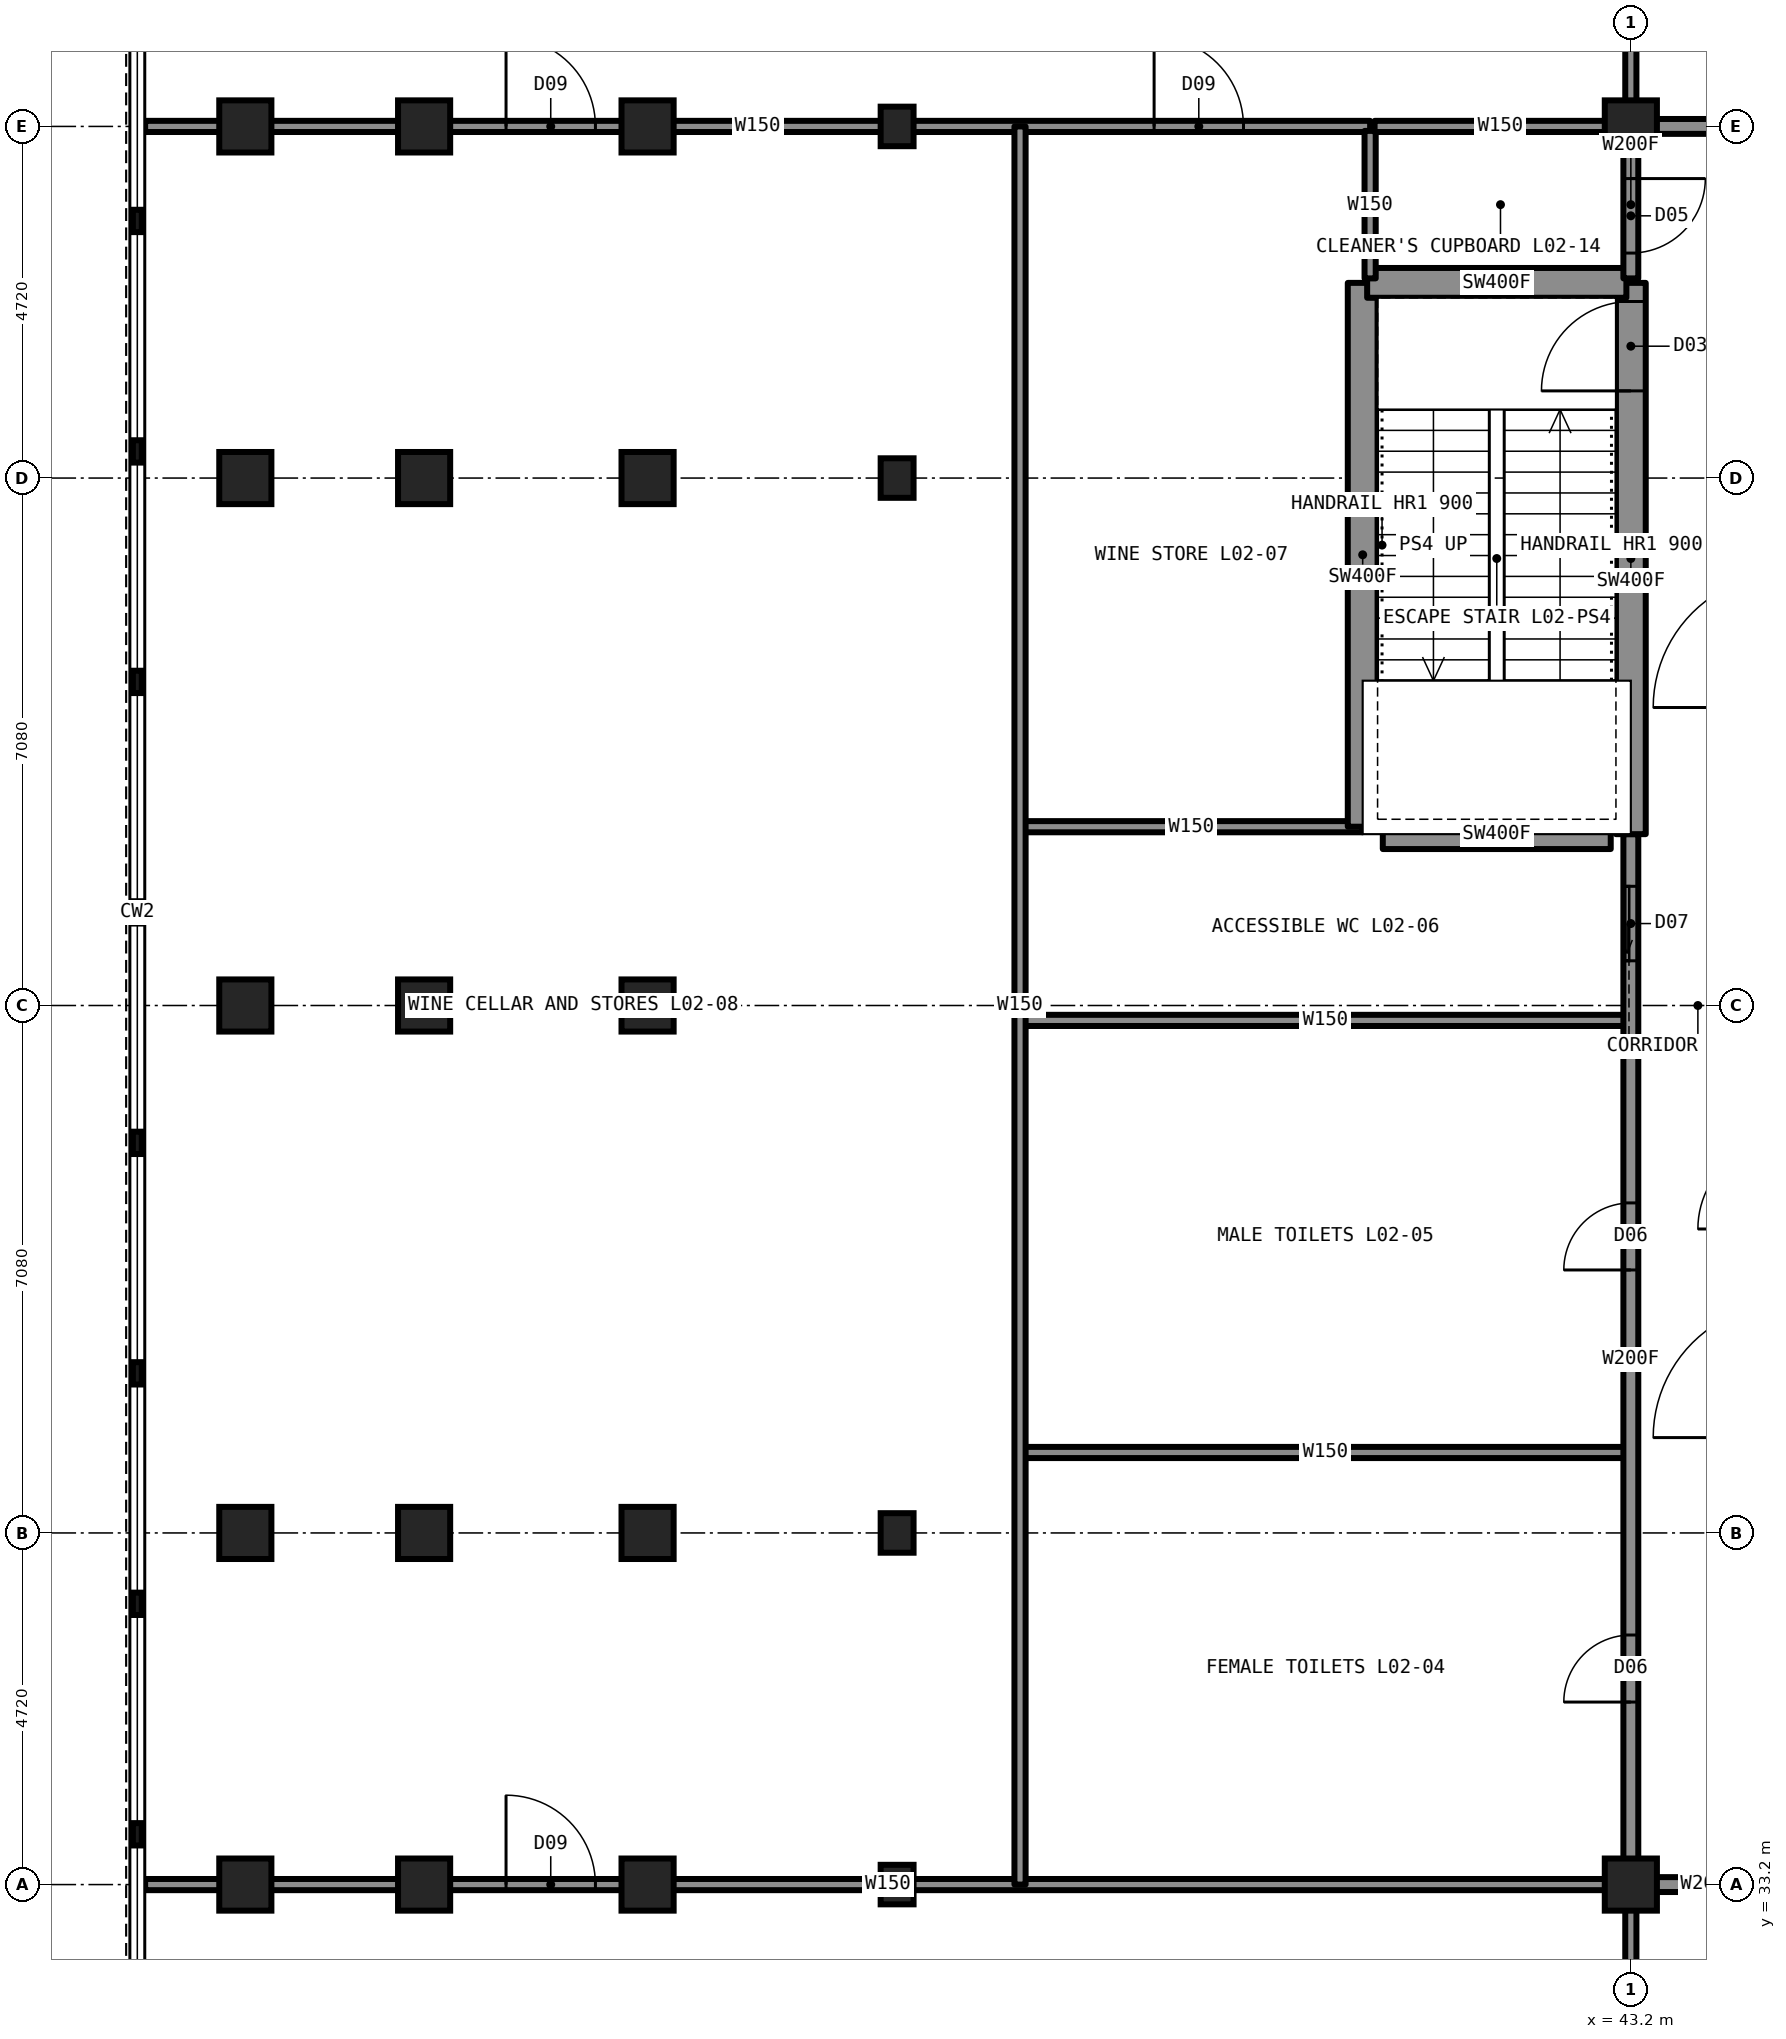
"""IFC4 building model, lengths in metres.
Left out: names, types, materials, properties, quantities, classifications, styles, units other than length and angle.
Written with IfcOpenShell. Run it as: python <this file> out.ifc"""

import sys

from ifc_helpers import new_model, si_unit, direction, frame, frame_2d, origin, origin_2d, place, context, subcontext, project, spatial, rectangle, hollow_rectangle, i_section, extrude, element, fill, save


model = new_model("IFC4")
c1 = context("Model", 3, precision=1e-05, world=origin(), true_north=direction((0.0, 1.0)))
c2 = subcontext(c1, "Body", "Model", "MODEL_VIEW")
j1 = project(units=[si_unit("LENGTHUNIT", "METRE"), si_unit("PLANEANGLEUNIT", "RADIAN")], contexts=[c1])
p1 = place(None, origin())
s1 = spatial("IfcSite", under=j1, at=p1, CompositionType="ELEMENT")
p2 = place(p1, origin())
s2 = spatial("IfcBuilding", under=s1, at=p2, CompositionType="ELEMENT")
p3 = place(p2, frame((0.0, 0.0, 11.0)))
s3 = spatial("IfcBuildingStorey", under=s2, at=p3, CompositionType="ELEMENT", Elevation=11.0)
for number, where, z_axis, x_axis in (
    (1, (33.35, 33.2, 0.0), (0.0, 0.0, 1.0), (1.0, 0.0, 0.0)),
    (2, (33.35, 37.92, 0.0), (0.0, 0.0, 1.0), (1.0, 0.0, 0.0)),
    (3, (33.35, 52.08, 0.0), (0.0, 0.0, 1.0), (1.0, 0.0, 0.0)),
    (4, (33.35, 56.8, 0.0), (0.0, 0.0, 1.0), (1.0, 0.0, 0.0)),
):
    element("IfcColumn", number, at=place(p3, frame(where, z_axis=z_axis, x_axis=x_axis)), inside=s3, PredefinedType="COLUMN", context=c2, shape_type="SweptSolid", body=[
        extrude(i_section(OverallWidth=0.442, OverallDepth=0.531, WebThickness=0.066, FlangeThickness=0.106, at=origin_2d()), origin(), (0.0, 0.0, 1.0), 5.0),
    ])
for number, where, z_axis, x_axis in (
    (5, (43.2, 33.2, 0.0), (0.0, 0.0, 1.0), (1.0, 0.0, 0.0)),
    (6, (43.2, 56.8, 0.0), (0.0, 0.0, 1.0), (1.0, 0.0, 0.0)),
):
    element("IfcColumn", number, at=place(p3, frame(where, z_axis=z_axis, x_axis=x_axis)), inside=s3, PredefinedType="COLUMN", context=c2, shape_type="SweptSolid", body=[
        extrude(hollow_rectangle(XDim=0.7, YDim=0.7, WallThickness=0.06, at=origin_2d()), origin(), (0.0, 0.0, 1.0), 5.0),
    ])
for number, where, z_axis, x_axis in (
    (7, (24.6, 33.2, 0.0), (0.0, 0.0, 1.0), (1.0, 0.0, 0.0)),
    (8, (24.6, 37.92, 0.0), (0.0, 0.0, 1.0), (1.0, 0.0, 0.0)),
    (9, (24.6, 45.0, 0.0), (0.0, 0.0, 1.0), (1.0, 0.0, 0.0)),
    (10, (24.6, 52.08, 0.0), (0.0, 0.0, 1.0), (1.0, 0.0, 0.0)),
    (11, (24.6, 56.8, 0.0), (0.0, 0.0, 1.0), (1.0, 0.0, 0.0)),
    (12, (27.0, 33.2, 0.0), (0.0, 0.0, 1.0), (1.0, 0.0, 0.0)),
    (13, (27.0, 37.92, 0.0), (0.0, 0.0, 1.0), (1.0, 0.0, 0.0)),
    (14, (27.0, 45.0, 0.0), (0.0, 0.0, 1.0), (1.0, 0.0, 0.0)),
    (15, (27.0, 52.08, 0.0), (0.0, 0.0, 1.0), (1.0, 0.0, 0.0)),
    (16, (27.0, 56.8, 0.0), (0.0, 0.0, 1.0), (1.0, 0.0, 0.0)),
    (17, (30.0, 33.2, 0.0), (0.0, 0.0, 1.0), (1.0, 0.0, 0.0)),
    (18, (30.0, 37.92, 0.0), (0.0, 0.0, 1.0), (1.0, 0.0, 0.0)),
    (19, (30.0, 45.0, 0.0), (0.0, 0.0, 1.0), (1.0, 0.0, 0.0)),
    (20, (30.0, 52.08, 0.0), (0.0, 0.0, 1.0), (1.0, 0.0, 0.0)),
    (21, (30.0, 56.8, 0.0), (0.0, 0.0, 1.0), (1.0, 0.0, 0.0)),
):
    element("IfcColumn", number, at=place(p3, frame(where, z_axis=z_axis, x_axis=x_axis)), inside=s3, PredefinedType="COLUMN", context=c2, shape_type="SweptSolid", body=[
        extrude(rectangle(XDim=0.7, YDim=0.7, at=origin_2d()), origin(), (0.0, 0.0, 1.0), 5.0),
    ])
p4 = place(p3, frame((35.0, 44.8, 0.0), z_axis=(0.0, 0.0, 1.0), x_axis=(1.0, 0.0, 0.0)))
e22 = element("IfcWall", 22, at=p4, inside=s3, PredefinedType="PARTITIONING", context=c2, shape_type="SweptSolid", body=[
    extrude(rectangle(XDim=8.2, YDim=0.15, at=frame_2d((4.1, 0.0))), origin(), (0.0, 0.0, 1.0), 4.65),
])
p5 = place(p3, frame((43.2, 33.2, 0.0), z_axis=(0.0, 0.0, 1.0), x_axis=(1.0, 0.0, 0.0)))
e23 = element("IfcWall", 23, at=p5, inside=s3, PredefinedType="PARTITIONING", context=c2, shape_type="SweptSolid", body=[
    extrude(rectangle(XDim=2.1, YDim=0.2, at=frame_2d((1.05, 0.0))), origin(), (0.0, 0.0, 1.0), 4.65),
])
p6 = place(p3, frame((23.255, 33.2, 0.0), z_axis=(0.0, 0.0, 1.0), x_axis=(1.0, 0.0, 0.0)))
e24 = element("IfcWall", 24, at=p6, inside=s3, PredefinedType="PARTITIONING", context=c2, shape_type="SweptSolid", body=[
    extrude(rectangle(XDim=19.945, YDim=0.15, at=frame_2d((9.973, 0.0))), origin(), (0.0, 0.0, 1.0), 4.65),
])
p7 = place(p6, frame((4.845, 0.0, 0.0)))
e25 = element("IfcOpeningElement", 25, at=p7, cuts=e24, PredefinedType="OPENING", context=c2, shape_type="SweptSolid", body=[
    extrude(rectangle(XDim=1.2, YDim=2.2, at=frame_2d((0.6, 1.1))), frame((0.0, 0.085, 0.0), z_axis=(0.0, -1.0, 0.0), x_axis=(1.0, 0.0, 0.0)), (0.0, 0.0, 1.0), 0.17),
])
p8 = place(p3, frame((35.0, 39.0, 0.0), z_axis=(0.0, 0.0, 1.0), x_axis=(1.0, 0.0, 0.0)))
e26 = element("IfcWall", 26, at=p8, inside=s3, PredefinedType="PARTITIONING", context=c2, shape_type="SweptSolid", body=[
    extrude(rectangle(XDim=8.2, YDim=0.15, at=frame_2d((4.1, 0.0))), origin(), (0.0, 0.0, 1.0), 4.65),
])
p9 = place(p3, frame((43.2, 56.8, 0.0), z_axis=(0.0, 0.0, 1.0), x_axis=(1.0, 0.0, 0.0)))
e27 = element("IfcWall", 27, at=p9, inside=s3, PredefinedType="PARTITIONING", context=c2, shape_type="SweptSolid", body=[
    extrude(rectangle(XDim=14.1, YDim=0.2, at=frame_2d((7.05, 0.0))), origin(), (0.0, 0.0, 1.0), 4.65),
])
p10 = place(p9, frame((5.3, 0.0, 0.0)))
e28 = element("IfcOpeningElement", 28, at=p10, cuts=e27, PredefinedType="OPENING", context=c2, shape_type="SweptSolid", body=[
    extrude(rectangle(XDim=1.0, YDim=2.1, at=frame_2d((0.5, 1.05))), frame((0.0, 0.11, 0.0), z_axis=(0.0, -1.0, 0.0), x_axis=(1.0, 0.0, 0.0)), (0.0, 0.0, 1.0), 0.22),
])
p11 = place(p3, frame((23.255, 56.8, 0.0), z_axis=(0.0, 0.0, 1.0), x_axis=(1.0, 0.0, 0.0)))
e29 = element("IfcWall", 29, at=p11, inside=s3, PredefinedType="PARTITIONING", context=c2, shape_type="SweptSolid", body=[
    extrude(rectangle(XDim=16.445, YDim=0.15, at=frame_2d((8.223, 0.0))), origin(), (0.0, 0.0, 1.0), 4.65),
])
p12 = place(p11, frame((13.545, 0.0, 0.0)))
e30 = element("IfcOpeningElement", 30, at=p12, cuts=e29, PredefinedType="OPENING", context=c2, shape_type="SweptSolid", body=[
    extrude(rectangle(XDim=1.2, YDim=2.2, at=frame_2d((0.6, 1.1))), frame((0.0, 0.085, 0.0), z_axis=(0.0, -1.0, 0.0), x_axis=(1.0, 0.0, 0.0)), (0.0, 0.0, 1.0), 0.17),
])
p13 = place(p11, frame((4.845, 0.0, 0.0)))
e31 = element("IfcOpeningElement", 31, at=p13, cuts=e29, PredefinedType="OPENING", context=c2, shape_type="SweptSolid", body=[
    extrude(rectangle(XDim=1.2, YDim=2.2, at=frame_2d((0.6, 1.1))), frame((0.0, 0.085, 0.0), z_axis=(0.0, -1.0, 0.0), x_axis=(1.0, 0.0, 0.0)), (0.0, 0.0, 1.0), 0.17),
])
p14 = place(p3, frame((39.87, 47.3, 0.0), z_axis=(0.0, 0.0, 1.0), x_axis=(1.0, 0.0, 0.0)))
e32 = element("IfcWall", 32, at=p14, inside=s3, PredefinedType="SHEAR", context=c2, shape_type="SweptSolid", body=[
    extrude(rectangle(XDim=3.06, YDim=0.4, at=frame_2d((1.53, 0.0))), origin(), (0.0, 0.0, 1.0), 5.0),
])
p15 = place(p3, frame((35.0, 47.4, 0.0), z_axis=(0.0, 0.0, 1.0), x_axis=(1.0, 0.0, 0.0)))
e33 = element("IfcWall", 33, at=p15, inside=s3, PredefinedType="PARTITIONING", context=c2, shape_type="SweptSolid", body=[
    extrude(rectangle(XDim=4.6, YDim=0.15, at=frame_2d((2.3, 0.0))), origin(), (0.0, 0.0, 1.0), 4.65),
])
p16 = place(p3, frame((43.2, 33.2, 0.0), z_axis=(0.0, 0.0, 1.0), x_axis=(0.0, 1.0, 0.0)))
e34 = element("IfcWall", 34, at=p16, inside=s3, PredefinedType="PARTITIONING", context=c2, shape_type="SweptSolid", body=[
    extrude(rectangle(XDim=14.1, YDim=0.2, at=frame_2d((7.05, 0.0))), origin(), (0.0, 0.0, 1.0), 4.65),
])
p17 = place(p16, frame((12.4, 0.0, 0.0)))
e35 = element("IfcOpeningElement", 35, at=p17, cuts=e34, PredefinedType="OPENING", context=c2, shape_type="SweptSolid", body=[
    extrude(rectangle(XDim=1.0, YDim=2.1, at=frame_2d((0.5, 1.05))), frame((0.0, 0.11, 0.0), z_axis=(0.0, -1.0, 0.0), x_axis=(1.0, 0.0, 0.0)), (0.0, 0.0, 1.0), 0.22),
])
p18 = place(p16, frame((2.45, 0.0, 0.0)))
e36 = element("IfcOpeningElement", 36, at=p18, cuts=e34, PredefinedType="OPENING", context=c2, shape_type="SweptSolid", body=[
    extrude(rectangle(XDim=0.9, YDim=2.1, at=frame_2d((0.45, 1.05))), frame((0.0, 0.11, 0.0), z_axis=(0.0, -1.0, 0.0), x_axis=(1.0, 0.0, 0.0)), (0.0, 0.0, 1.0), 0.22),
])
p19 = place(p16, frame((8.25, 0.0, 0.0)))
e37 = element("IfcOpeningElement", 37, at=p19, cuts=e34, PredefinedType="OPENING", context=c2, shape_type="SweptSolid", body=[
    extrude(rectangle(XDim=0.9, YDim=2.1, at=frame_2d((0.45, 1.05))), frame((0.0, 0.11, 0.0), z_axis=(0.0, -1.0, 0.0), x_axis=(1.0, 0.0, 0.0)), (0.0, 0.0, 1.0), 0.22),
])
p20 = place(p3, frame((43.2, 21.755, 0.0), z_axis=(0.0, 0.0, 1.0), x_axis=(0.0, 1.0, 0.0)))
e38 = element("IfcWall", 38, at=p20, inside=s3, PredefinedType="PARTITIONING", context=c2, shape_type="SweptSolid", body=[
    extrude(rectangle(XDim=11.445, YDim=0.15, at=frame_2d((5.723, 0.0))), origin(), (0.0, 0.0, 1.0), 4.65),
])
p21 = place(p20, frame((4.445, 0.0, 0.0)))
e39 = element("IfcOpeningElement", 39, at=p21, cuts=e38, PredefinedType="OPENING", context=c2, shape_type="SweptSolid", body=[
    extrude(rectangle(XDim=1.6, YDim=2.4, at=frame_2d((0.8, 1.2))), frame((0.0, 0.085, 0.0), z_axis=(0.0, -1.0, 0.0), x_axis=(1.0, 0.0, 0.0)), (0.0, 0.0, 1.0), 0.17),
])
p22 = place(p3, frame((43.2, 56.8, 0.0), z_axis=(0.0, 0.0, 1.0), x_axis=(0.0, 1.0, 0.0)))
e40 = element("IfcWall", 40, at=p22, inside=s3, PredefinedType="PARTITIONING", context=c2, shape_type="SweptSolid", body=[
    extrude(rectangle(XDim=13.9, YDim=0.15, at=frame_2d((6.95, 0.0))), origin(), (0.0, 0.0, 1.0), 4.65),
])
p23 = place(p22, frame((6.6, 0.0, 0.0)))
e41 = element("IfcOpeningElement", 41, at=p23, cuts=e40, PredefinedType="OPENING", context=c2, shape_type="SweptSolid", body=[
    extrude(rectangle(XDim=1.2, YDim=2.2, at=frame_2d((0.6, 1.1))), frame((0.0, 0.085, 0.0), z_axis=(0.0, -1.0, 0.0), x_axis=(1.0, 0.0, 0.0)), (0.0, 0.0, 1.0), 0.17),
])
p24 = place(p3, frame((43.2, 47.3, 0.0), z_axis=(0.0, 0.0, 1.0), x_axis=(0.0, 1.0, 0.0)))
e42 = element("IfcWall", 42, at=p24, inside=s3, PredefinedType="SHEAR", context=c2, shape_type="SweptSolid", body=[
    extrude(rectangle(XDim=7.4, YDim=0.4, at=frame_2d((3.7, 0.0))), origin(), (0.0, 0.0, 1.0), 5.0),
])
p25 = place(p24, frame((5.95, 0.0, 0.0)))
e43 = element("IfcOpeningElement", 43, at=p25, cuts=e42, PredefinedType="OPENING", context=c2, shape_type="SweptSolid", body=[
    extrude(rectangle(XDim=1.2, YDim=2.2, at=frame_2d((0.6, 1.1))), frame((0.0, 0.21, 0.0), z_axis=(0.0, -1.0, 0.0), x_axis=(1.0, 0.0, 0.0)), (0.0, 0.0, 1.0), 0.42),
])
p26 = place(p3, frame((39.6, 47.4, 0.0), z_axis=(0.0, 0.0, 1.0), x_axis=(0.0, 1.0, 0.0)))
e44 = element("IfcWall", 44, at=p26, inside=s3, PredefinedType="SHEAR", context=c2, shape_type="SweptSolid", body=[
    extrude(rectangle(XDim=7.3, YDim=0.4, at=frame_2d((3.65, 0.0))), origin(), (0.0, 0.0, 1.0), 5.0),
])
p27 = place(p3, frame((35.0, 33.2, 0.0), z_axis=(0.0, 0.0, 1.0), x_axis=(0.0, 1.0, 0.0)))
e45 = element("IfcWall", 45, at=p27, inside=s3, PredefinedType="PARTITIONING", context=c2, shape_type="SweptSolid", body=[
    extrude(rectangle(XDim=23.6, YDim=0.15, at=frame_2d((11.8, 0.0))), origin(), (0.0, 0.0, 1.0), 4.65),
])
p28 = place(p3, frame((43.14, 54.7, 0.0), z_axis=(0.0, 0.0, 1.0), x_axis=(-1.0, 0.0, 0.0)))
e46 = element("IfcWall", 46, at=p28, inside=s3, PredefinedType="SHEAR", context=c2, shape_type="SweptSolid", body=[
    extrude(rectangle(XDim=3.48, YDim=0.4, at=frame_2d((1.74, 0.0))), origin(), (0.0, 0.0, 1.0), 5.0),
])
p29 = place(p3, frame((43.2, 56.74, 0.0), z_axis=(0.0, 0.0, 1.0), x_axis=(0.0, -1.0, 0.0)))
e47 = element("IfcWall", 47, at=p29, inside=s3, PredefinedType="PARTITIONING", context=c2, shape_type="SweptSolid", body=[
    extrude(rectangle(XDim=1.98, YDim=0.2, at=frame_2d((0.99, 0.0))), origin(), (0.0, 0.0, 1.0), 4.65),
])
p30 = place(p29, frame((0.64, 0.0, 0.0)))
e48 = element("IfcOpeningElement", 48, at=p30, cuts=e47, PredefinedType="OPENING", context=c2, shape_type="SweptSolid", body=[
    extrude(rectangle(XDim=1.0, YDim=2.1, at=frame_2d((0.5, 1.05))), frame((0.0, 0.11, 0.0), z_axis=(0.0, -1.0, 0.0), x_axis=(1.0, 0.0, 0.0)), (0.0, 0.0, 1.0), 0.22),
])
p31 = place(p3, frame((39.7, 54.76, 0.0), z_axis=(0.0, 0.0, 1.0), x_axis=(0.0, 1.0, 0.0)))
e49 = element("IfcWall", 49, at=p31, inside=s3, PredefinedType="PARTITIONING", context=c2, shape_type="SweptSolid", body=[
    extrude(rectangle(XDim=1.98, YDim=0.15, at=frame_2d((0.99, 0.0))), origin(), (0.0, 0.0, 1.0), 4.65),
])
p32 = place(p3, frame((39.76, 56.8, 0.0), z_axis=(0.0, 0.0, 1.0), x_axis=(1.0, 0.0, 0.0)))
e50 = element("IfcWall", 50, at=p32, inside=s3, PredefinedType="PARTITIONING", context=c2, shape_type="SweptSolid", body=[
    extrude(rectangle(XDim=3.38, YDim=0.15, at=frame_2d((1.69, 0.0))), origin(), (0.0, 0.0, 1.0), 4.65),
])
p33 = place(p25, origin())
e51 = element("IfcDoor", 51, at=p33, inside=s3, OperationType="SINGLE_SWING_LEFT", PredefinedType="DOOR", context=c2, shape_type="SweptSolid", body=[
    extrude(rectangle(XDim=1.2, YDim=2.2, at=frame_2d((0.6, 1.1))), frame((0.0, 0.025, 0.0), z_axis=(0.0, -1.0, 0.0), x_axis=(1.0, 0.0, 0.0)), (0.0, 0.0, 1.0), 0.05),
])
fill(e43, e51)
p34 = place(p12, origin())
e52 = element("IfcDoor", 52, at=p34, inside=s3, OperationType="SINGLE_SWING_LEFT", PredefinedType="DOOR", context=c2, shape_type="SweptSolid", body=[
    extrude(rectangle(XDim=1.2, YDim=2.2, at=frame_2d((0.6, 1.1))), frame((0.0, 0.025, 0.0), z_axis=(0.0, -1.0, 0.0), x_axis=(1.0, 0.0, 0.0)), (0.0, 0.0, 1.0), 0.05),
])
fill(e30, e52)
p35 = place(p13, origin())
e53 = element("IfcDoor", 53, at=p35, inside=s3, OperationType="SINGLE_SWING_LEFT", PredefinedType="DOOR", context=c2, shape_type="SweptSolid", body=[
    extrude(rectangle(XDim=1.2, YDim=2.2, at=frame_2d((0.6, 1.1))), frame((0.0, 0.025, 0.0), z_axis=(0.0, -1.0, 0.0), x_axis=(1.0, 0.0, 0.0)), (0.0, 0.0, 1.0), 0.05),
])
fill(e31, e53)
p36 = place(p7, origin())
e54 = element("IfcDoor", 54, at=p36, inside=s3, OperationType="SINGLE_SWING_LEFT", PredefinedType="DOOR", context=c2, shape_type="SweptSolid", body=[
    extrude(rectangle(XDim=1.2, YDim=2.2, at=frame_2d((0.6, 1.1))), frame((0.0, 0.025, 0.0), z_axis=(0.0, -1.0, 0.0), x_axis=(1.0, 0.0, 0.0)), (0.0, 0.0, 1.0), 0.05),
])
fill(e25, e54)
p37 = place(p30, origin())
e55 = element("IfcDoor", 55, at=p37, inside=s3, OperationType="SINGLE_SWING_LEFT", PredefinedType="DOOR", context=c2, shape_type="SweptSolid", body=[
    extrude(rectangle(XDim=1.0, YDim=2.1, at=frame_2d((0.5, 1.05))), frame((0.0, 0.025, 0.0), z_axis=(0.0, -1.0, 0.0), x_axis=(1.0, 0.0, 0.0)), (0.0, 0.0, 1.0), 0.05),
])
fill(e48, e55)
p38 = place(p17, origin())
e56 = element("IfcDoor", 56, at=p38, inside=s3, OperationType="SLIDING_TO_LEFT", PredefinedType="DOOR", context=c2, shape_type="SweptSolid", body=[
    extrude(rectangle(XDim=1.0, YDim=2.1, at=frame_2d((0.5, 1.05))), frame((0.0, 0.025, 0.0), z_axis=(0.0, -1.0, 0.0), x_axis=(1.0, 0.0, 0.0)), (0.0, 0.0, 1.0), 0.05),
])
fill(e35, e56)
p39 = place(p18, origin())
e57 = element("IfcDoor", 57, at=p39, inside=s3, OperationType="SINGLE_SWING_LEFT", PredefinedType="DOOR", context=c2, shape_type="SweptSolid", body=[
    extrude(rectangle(XDim=0.9, YDim=2.1, at=frame_2d((0.45, 1.05))), frame((0.0, 0.025, 0.0), z_axis=(0.0, -1.0, 0.0), x_axis=(1.0, 0.0, 0.0)), (0.0, 0.0, 1.0), 0.05),
])
fill(e36, e57)
p40 = place(p19, origin())
e58 = element("IfcDoor", 58, at=p40, inside=s3, OperationType="SINGLE_SWING_LEFT", PredefinedType="DOOR", context=c2, shape_type="SweptSolid", body=[
    extrude(rectangle(XDim=0.9, YDim=2.1, at=frame_2d((0.45, 1.05))), frame((0.0, 0.025, 0.0), z_axis=(0.0, -1.0, 0.0), x_axis=(1.0, 0.0, 0.0)), (0.0, 0.0, 1.0), 0.05),
])
fill(e37, e58)
save(model, sys.argv[1])
